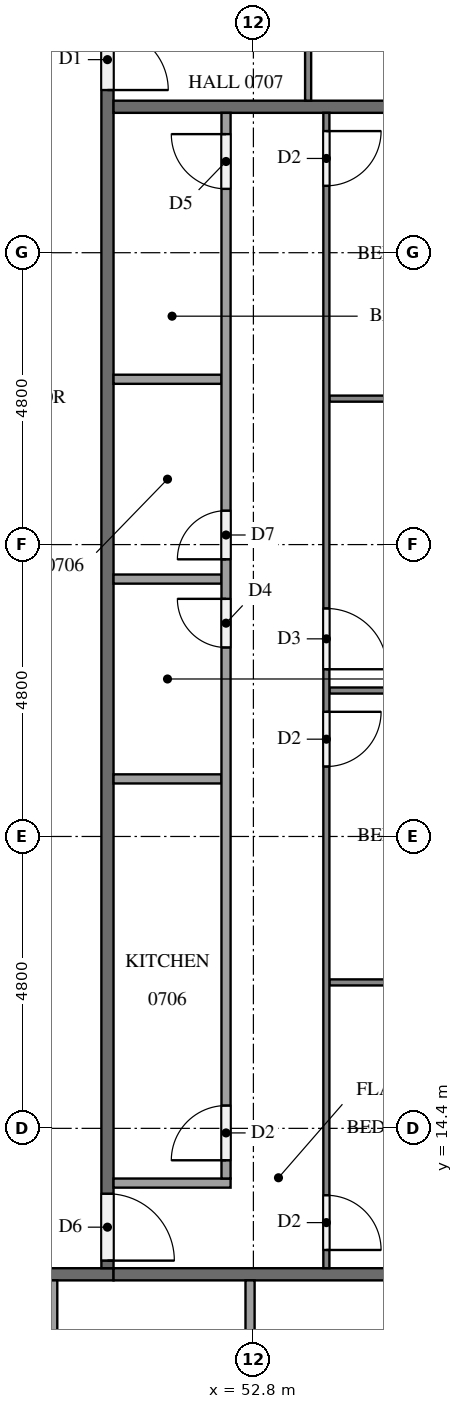
"""IFC4 building model, lengths in metres.
Left out: names, types, materials, properties, quantities, classifications, styles, units other than length and angle.
Written with IfcOpenShell. Run it as: python <this file> out.ifc"""

import sys

from ifc_helpers import new_model, si_unit, direction, frame, frame_2d, origin, place, context, subcontext, project, spatial, rectangle, extrude, element, fill, save


model = new_model("IFC4")
c1 = context("Model", 3, precision=1e-05, world=origin(), true_north=direction((0.0, 1.0)))
c2 = subcontext(c1, "Body", "Model", "MODEL_VIEW")
j1 = project(units=[si_unit("LENGTHUNIT", "METRE"), si_unit("PLANEANGLEUNIT", "RADIAN")], contexts=[c1])
p1 = place(None, origin())
s1 = spatial("IfcSite", under=j1, at=p1, CompositionType="ELEMENT")
p2 = place(p1, origin())
s2 = spatial("IfcBuilding", under=s1, at=p2, CompositionType="ELEMENT")
p3 = place(p2, frame((0.0, 0.0, 32.9)))
s3 = spatial("IfcBuildingStorey", under=s2, at=p3, CompositionType="ELEMENT", Elevation=32.9)
p4 = place(p3, frame((50.5, 12.0, 0.0), z_axis=(0.0, 0.0, 1.0), x_axis=(-1.0, 0.0, 0.0)))
e1 = element("IfcWall", 1, at=p4, inside=s3, PredefinedType="PARTITIONING", context=c2, shape_type="SweptSolid", body=[
    extrude(rectangle(XDim=38.6, YDim=0.2, at=frame_2d((19.3, 0.0))), origin(), (0.0, 0.0, 1.0), 3.2),
])
p5 = place(p4, frame((36.375, 0.0, 0.0)))
e2 = element("IfcOpeningElement", 2, at=p5, cuts=e1, PredefinedType="OPENING", context=c2, shape_type="SweptSolid", body=[
    extrude(rectangle(XDim=1.0, YDim=2.1, at=frame_2d((0.5, 1.05))), frame((0.0, 0.11, 0.0), z_axis=(0.0, -1.0, 0.0), x_axis=(1.0, 0.0, 0.0)), (0.0, 0.0, 1.0), 0.22),
])
p6 = place(p4, frame((34.825, 0.0, 0.0)))
e3 = element("IfcOpeningElement", 3, at=p6, cuts=e1, PredefinedType="OPENING", context=c2, shape_type="SweptSolid", body=[
    extrude(rectangle(XDim=1.0, YDim=2.1, at=frame_2d((0.5, 1.05))), frame((0.0, 0.11, 0.0), z_axis=(0.0, -1.0, 0.0), x_axis=(1.0, 0.0, 0.0)), (0.0, 0.0, 1.0), 0.22),
])
p7 = place(p4, frame((22.825, 0.0, 0.0)))
e4 = element("IfcOpeningElement", 4, at=p7, cuts=e1, PredefinedType="OPENING", context=c2, shape_type="SweptSolid", body=[
    extrude(rectangle(XDim=1.0, YDim=2.1, at=frame_2d((0.5, 1.05))), frame((0.0, 0.11, 0.0), z_axis=(0.0, -1.0, 0.0), x_axis=(1.0, 0.0, 0.0)), (0.0, 0.0, 1.0), 0.22),
])
p8 = place(p4, frame((8.425, 0.0, 0.0)))
e5 = element("IfcOpeningElement", 5, at=p8, cuts=e1, PredefinedType="OPENING", context=c2, shape_type="SweptSolid", body=[
    extrude(rectangle(XDim=1.0, YDim=2.1, at=frame_2d((0.5, 1.05))), frame((0.0, 0.11, 0.0), z_axis=(0.0, -1.0, 0.0), x_axis=(1.0, 0.0, 0.0)), (0.0, 0.0, 1.0), 0.22),
])
p9 = place(p4, frame((1.225, 0.0, 0.0)))
e6 = element("IfcOpeningElement", 6, at=p9, cuts=e1, PredefinedType="OPENING", context=c2, shape_type="SweptSolid", body=[
    extrude(rectangle(XDim=1.0, YDim=2.1, at=frame_2d((0.5, 1.05))), frame((0.0, 0.11, 0.0), z_axis=(0.0, -1.0, 0.0), x_axis=(1.0, 0.0, 0.0)), (0.0, 0.0, 1.0), 0.22),
])
p10 = place(p3, frame((50.4, 40.7, 0.0), z_axis=(0.0, 0.0, 1.0), x_axis=(0.0, -1.0, 0.0)))
e7 = element("IfcWall", 7, at=p10, inside=s3, PredefinedType="PARTITIONING", context=c2, shape_type="SweptSolid", body=[
    extrude(rectangle(XDim=28.6, YDim=0.2, at=frame_2d((14.3, 0.0))), origin(), (0.0, 0.0, 1.0), 3.2),
])
p11 = place(p10, frame((27.375, 0.0, 0.0)))
e8 = element("IfcOpeningElement", 8, at=p11, cuts=e7, PredefinedType="OPENING", context=c2, shape_type="SweptSolid", body=[
    extrude(rectangle(XDim=1.1, YDim=2.1, at=frame_2d((0.55, 1.05))), frame((0.0, 0.11, 0.0), z_axis=(0.0, -1.0, 0.0), x_axis=(1.0, 0.0, 0.0)), (0.0, 0.0, 1.0), 0.22),
])
p12 = place(p10, frame((8.225, 0.0, 0.0)))
e9 = element("IfcOpeningElement", 9, at=p12, cuts=e7, PredefinedType="OPENING", context=c2, shape_type="SweptSolid", body=[
    extrude(rectangle(XDim=1.0, YDim=2.1, at=frame_2d((0.5, 1.05))), frame((0.0, 0.11, 0.0), z_axis=(0.0, -1.0, 0.0), x_axis=(1.0, 0.0, 0.0)), (0.0, 0.0, 1.0), 0.22),
])
for number, where, z_axis, x_axis in (
    (10, (50.5, 12.0, 0.0), (0.0, 0.0, 1.0), (1.0, 0.0, 0.0)),
    (11, (50.5, 31.2, 0.0), (0.0, 0.0, 1.0), (1.0, 0.0, 0.0)),
):
    element("IfcWall", number, at=place(p3, frame(where, z_axis=z_axis, x_axis=x_axis)), inside=s3, PredefinedType="PARTITIONING", context=c2, shape_type="SweptSolid", body=[
        extrude(rectangle(XDim=7.0, YDim=0.2, at=frame_2d((3.5, 0.0))), origin(), (0.0, 0.0, 1.0), 3.2),
    ])
p13 = place(p3, frame((52.745, 11.9, 0.0), z_axis=(0.0, 0.0, 1.0), x_axis=(0.0, -1.0, 0.0)))
e12 = element("IfcWall", 12, at=p13, inside=s3, PredefinedType="PARTITIONING", context=c2, shape_type="SweptSolid", body=[
    extrude(rectangle(XDim=3.275, YDim=0.15, at=frame_2d((1.637, 0.0))), origin(), (0.0, 0.0, 1.0), 3.2),
])
p14 = place(p3, frame((49.5, 11.9, 0.0), z_axis=(0.0, 0.0, 1.0), x_axis=(0.0, -1.0, 0.0)))
e13 = element("IfcWall", 13, at=p14, inside=s3, PredefinedType="PARTITIONING", context=c2, shape_type="SweptSolid", body=[
    extrude(rectangle(XDim=3.425, YDim=0.15, at=frame_2d((1.712, 0.0))), origin(), (0.0, 0.0, 1.0), 3.2),
])
for number, where, z_axis, x_axis in (
    (14, (54.05, 16.8, 0.0), (0.0, 0.0, 1.0), (1.0, 0.0, 0.0)),
    (15, (54.05, 21.6, 0.0), (0.0, 0.0, 1.0), (1.0, 0.0, 0.0)),
    (16, (54.05, 26.4, 0.0), (0.0, 0.0, 1.0), (1.0, 0.0, 0.0)),
):
    element("IfcWall", number, at=place(p3, frame(where, z_axis=z_axis, x_axis=x_axis)), inside=s3, PredefinedType="PARTITIONING", context=c2, shape_type="SweptSolid", body=[
        extrude(rectangle(XDim=3.45, YDim=0.1, at=frame_2d((1.725, 0.0))), origin(), (0.0, 0.0, 1.0), 3.2),
    ])
p15 = place(p3, frame((54.0, 31.1, 0.0), z_axis=(0.0, 0.0, 1.0), x_axis=(0.0, -1.0, 0.0)))
e17 = element("IfcWall", 17, at=p15, inside=s3, PredefinedType="PARTITIONING", context=c2, shape_type="SweptSolid", body=[
    extrude(rectangle(XDim=19.0, YDim=0.1, at=frame_2d((9.5, 0.0))), origin(), (0.0, 0.0, 1.0), 3.2),
])
p16 = place(p15, frame((17.8, 0.0, 0.0)))
e18 = element("IfcOpeningElement", 18, at=p16, cuts=e17, PredefinedType="OPENING", context=c2, shape_type="SweptSolid", body=[
    extrude(rectangle(XDim=0.9, YDim=2.1, at=frame_2d((0.45, 1.05))), frame((0.0, 0.06, 0.0), z_axis=(0.0, -1.0, 0.0), x_axis=(1.0, 0.0, 0.0)), (0.0, 0.0, 1.0), 0.12),
])
p17 = place(p15, frame((9.85, 0.0, 0.0)))
e19 = element("IfcOpeningElement", 19, at=p17, cuts=e17, PredefinedType="OPENING", context=c2, shape_type="SweptSolid", body=[
    extrude(rectangle(XDim=0.9, YDim=2.1, at=frame_2d((0.45, 1.05))), frame((0.0, 0.06, 0.0), z_axis=(0.0, -1.0, 0.0), x_axis=(1.0, 0.0, 0.0)), (0.0, 0.0, 1.0), 0.12),
])
p18 = place(p15, frame((8.15, 0.0, 0.0)))
e20 = element("IfcOpeningElement", 20, at=p18, cuts=e17, PredefinedType="OPENING", context=c2, shape_type="SweptSolid", body=[
    extrude(rectangle(XDim=1.0, YDim=2.1, at=frame_2d((0.5, 1.05))), frame((0.0, 0.06, 0.0), z_axis=(0.0, -1.0, 0.0), x_axis=(1.0, 0.0, 0.0)), (0.0, 0.0, 1.0), 0.12),
])
p19 = place(p15, frame((0.3, 0.0, 0.0)))
e21 = element("IfcOpeningElement", 21, at=p19, cuts=e17, PredefinedType="OPENING", context=c2, shape_type="SweptSolid", body=[
    extrude(rectangle(XDim=0.9, YDim=2.1, at=frame_2d((0.45, 1.05))), frame((0.0, 0.06, 0.0), z_axis=(0.0, -1.0, 0.0), x_axis=(1.0, 0.0, 0.0)), (0.0, 0.0, 1.0), 0.12),
])
for number, where, z_axis, x_axis in (
    (22, (50.5, 20.147, 0.0), (0.0, 0.0, 1.0), (1.0, 0.0, 0.0)),
    (23, (50.5, 23.433, 0.0), (0.0, 0.0, 1.0), (1.0, 0.0, 0.0)),
    (24, (50.5, 26.719, 0.0), (0.0, 0.0, 1.0), (1.0, 0.0, 0.0)),
):
    element("IfcWall", number, at=place(p3, frame(where, z_axis=z_axis, x_axis=x_axis)), inside=s3, PredefinedType="PARTITIONING", context=c2, shape_type="SweptSolid", body=[
        extrude(rectangle(XDim=1.775, YDim=0.15, at=frame_2d((0.887, 0.0))), origin(), (0.0, 0.0, 1.0), 3.2),
    ])
p20 = place(p3, frame((50.5, 13.5, 0.0), z_axis=(0.0, 0.0, 1.0), x_axis=(1.0, 0.0, 0.0)))
e25 = element("IfcWall", 25, at=p20, inside=s3, PredefinedType="PARTITIONING", context=c2, shape_type="SweptSolid", body=[
    extrude(rectangle(XDim=1.925, YDim=0.15, at=frame_2d((0.962, 0.0))), origin(), (0.0, 0.0, 1.0), 3.2),
])
p21 = place(p3, frame((52.35, 13.575, 0.0), z_axis=(0.0, 0.0, 1.0), x_axis=(0.0, 1.0, 0.0)))
e26 = element("IfcWall", 26, at=p21, inside=s3, PredefinedType="PARTITIONING", context=c2, shape_type="SweptSolid", body=[
    extrude(rectangle(XDim=17.525, YDim=0.15, at=frame_2d((8.763, 0.0))), origin(), (0.0, 0.0, 1.0), 3.2),
])
p22 = place(p21, frame((0.3, 0.0, 0.0)))
e27 = element("IfcOpeningElement", 27, at=p22, cuts=e26, PredefinedType="OPENING", context=c2, shape_type="SweptSolid", body=[
    extrude(rectangle(XDim=0.9, YDim=2.1, at=frame_2d((0.45, 1.05))), frame((0.0, 0.085, 0.0), z_axis=(0.0, -1.0, 0.0), x_axis=(1.0, 0.0, 0.0)), (0.0, 0.0, 1.0), 0.17),
])
p23 = place(p21, frame((8.733, 0.0, 0.0)))
e28 = element("IfcOpeningElement", 28, at=p23, cuts=e26, PredefinedType="OPENING", context=c2, shape_type="SweptSolid", body=[
    extrude(rectangle(XDim=0.8, YDim=2.1, at=frame_2d((0.4, 1.05))), frame((0.0, 0.085, 0.0), z_axis=(0.0, -1.0, 0.0), x_axis=(1.0, 0.0, 0.0)), (0.0, 0.0, 1.0), 0.17),
])
p24 = place(p21, frame((10.183, 0.0, 0.0)))
e29 = element("IfcOpeningElement", 29, at=p24, cuts=e26, PredefinedType="OPENING", context=c2, shape_type="SweptSolid", body=[
    extrude(rectangle(XDim=0.8, YDim=2.1, at=frame_2d((0.4, 1.05))), frame((0.0, 0.085, 0.0), z_axis=(0.0, -1.0, 0.0), x_axis=(1.0, 0.0, 0.0)), (0.0, 0.0, 1.0), 0.17),
])
p25 = place(p21, frame((16.275, 0.0, 0.0)))
e30 = element("IfcOpeningElement", 30, at=p25, cuts=e26, PredefinedType="OPENING", context=c2, shape_type="SweptSolid", body=[
    extrude(rectangle(XDim=0.9, YDim=2.1, at=frame_2d((0.45, 1.05))), frame((0.0, 0.085, 0.0), z_axis=(0.0, -1.0, 0.0), x_axis=(1.0, 0.0, 0.0)), (0.0, 0.0, 1.0), 0.17),
])
p26 = place(p3, frame((53.7, 47.659, 0.0), z_axis=(0.0, 0.0, 1.0), x_axis=(0.0, -1.0, 0.0)))
e31 = element("IfcWall", 31, at=p26, inside=s3, PredefinedType="PARTITIONING", context=c2, shape_type="SweptSolid", body=[
    extrude(rectangle(XDim=16.359, YDim=0.1, at=frame_2d((8.179, 0.0))), origin(), (0.0, 0.0, 1.0), 3.2),
])
p27 = place(p26, frame((12.009, 0.0, 0.0)))
e32 = element("IfcOpeningElement", 32, at=p27, cuts=e31, PredefinedType="OPENING", context=c2, shape_type="SweptSolid", body=[
    extrude(rectangle(XDim=0.9, YDim=2.1, at=frame_2d((0.45, 1.05))), frame((0.0, 0.06, 0.0), z_axis=(0.0, -1.0, 0.0), x_axis=(1.0, 0.0, 0.0)), (0.0, 0.0, 1.0), 0.12),
])
p28 = place(p26, frame((10.309, 0.0, 0.0)))
e33 = element("IfcOpeningElement", 33, at=p28, cuts=e31, PredefinedType="OPENING", context=c2, shape_type="SweptSolid", body=[
    extrude(rectangle(XDim=1.0, YDim=2.1, at=frame_2d((0.5, 1.05))), frame((0.0, 0.06, 0.0), z_axis=(0.0, -1.0, 0.0), x_axis=(1.0, 0.0, 0.0)), (0.0, 0.0, 1.0), 0.12),
])
p29 = place(p26, frame((0.3, 0.0, 0.0)))
e34 = element("IfcOpeningElement", 34, at=p29, cuts=e31, PredefinedType="OPENING", context=c2, shape_type="SweptSolid", body=[
    extrude(rectangle(XDim=0.9, YDim=2.1, at=frame_2d((0.45, 1.05))), frame((0.0, 0.06, 0.0), z_axis=(0.0, -1.0, 0.0), x_axis=(1.0, 0.0, 0.0)), (0.0, 0.0, 1.0), 0.12),
])
p30 = place(p11, origin())
e35 = element("IfcDoor", 35, at=p30, inside=s3, OperationType="SINGLE_SWING_RIGHT", PredefinedType="DOOR", context=c2, shape_type="SweptSolid", body=[
    extrude(rectangle(XDim=1.1, YDim=2.1, at=frame_2d((0.55, 1.05))), frame((0.0, 0.025, 0.0), z_axis=(0.0, -1.0, 0.0), x_axis=(1.0, 0.0, 0.0)), (0.0, 0.0, 1.0), 0.05),
])
fill(e8, e35)
p31 = place(p12, origin())
e36 = element("IfcDoor", 36, at=p31, inside=s3, OperationType="SINGLE_SWING_RIGHT", PredefinedType="DOOR", context=c2, shape_type="SweptSolid", body=[
    extrude(rectangle(XDim=1.0, YDim=2.1, at=frame_2d((0.5, 1.05))), frame((0.0, 0.025, 0.0), z_axis=(0.0, -1.0, 0.0), x_axis=(1.0, 0.0, 0.0)), (0.0, 0.0, 1.0), 0.05),
])
fill(e9, e36)
p32 = place(p16, origin())
e37 = element("IfcDoor", 37, at=p32, inside=s3, OperationType="SINGLE_SWING_RIGHT", PredefinedType="DOOR", context=c2, shape_type="SweptSolid", body=[
    extrude(rectangle(XDim=0.9, YDim=2.1, at=frame_2d((0.45, 1.05))), frame((0.0, 0.025, 0.0), z_axis=(0.0, -1.0, 0.0), x_axis=(1.0, 0.0, 0.0)), (0.0, 0.0, 1.0), 0.05),
])
fill(e18, e37)
p33 = place(p17, origin())
e38 = element("IfcDoor", 38, at=p33, inside=s3, OperationType="SINGLE_SWING_LEFT", PredefinedType="DOOR", context=c2, shape_type="SweptSolid", body=[
    extrude(rectangle(XDim=0.9, YDim=2.1, at=frame_2d((0.45, 1.05))), frame((0.0, 0.025, 0.0), z_axis=(0.0, -1.0, 0.0), x_axis=(1.0, 0.0, 0.0)), (0.0, 0.0, 1.0), 0.05),
])
fill(e19, e38)
p34 = place(p18, origin())
e39 = element("IfcDoor", 39, at=p34, inside=s3, OperationType="SINGLE_SWING_RIGHT", PredefinedType="DOOR", context=c2, shape_type="SweptSolid", body=[
    extrude(rectangle(XDim=1.0, YDim=2.1, at=frame_2d((0.5, 1.05))), frame((0.0, 0.025, 0.0), z_axis=(0.0, -1.0, 0.0), x_axis=(1.0, 0.0, 0.0)), (0.0, 0.0, 1.0), 0.05),
])
fill(e20, e39)
p35 = place(p19, origin())
e40 = element("IfcDoor", 40, at=p35, inside=s3, OperationType="SINGLE_SWING_LEFT", PredefinedType="DOOR", context=c2, shape_type="SweptSolid", body=[
    extrude(rectangle(XDim=0.9, YDim=2.1, at=frame_2d((0.45, 1.05))), frame((0.0, 0.025, 0.0), z_axis=(0.0, -1.0, 0.0), x_axis=(1.0, 0.0, 0.0)), (0.0, 0.0, 1.0), 0.05),
])
fill(e21, e40)
p36 = place(p22, origin())
e41 = element("IfcDoor", 41, at=p36, inside=s3, OperationType="SINGLE_SWING_LEFT", PredefinedType="DOOR", context=c2, shape_type="SweptSolid", body=[
    extrude(rectangle(XDim=0.9, YDim=2.1, at=frame_2d((0.45, 1.05))), frame((0.0, 0.025, 0.0), z_axis=(0.0, -1.0, 0.0), x_axis=(1.0, 0.0, 0.0)), (0.0, 0.0, 1.0), 0.05),
])
fill(e27, e41)
p37 = place(p23, origin())
e42 = element("IfcDoor", 42, at=p37, inside=s3, OperationType="SINGLE_SWING_RIGHT", PredefinedType="DOOR", context=c2, shape_type="SweptSolid", body=[
    extrude(rectangle(XDim=0.8, YDim=2.1, at=frame_2d((0.4, 1.05))), frame((0.0, 0.025, 0.0), z_axis=(0.0, -1.0, 0.0), x_axis=(1.0, 0.0, 0.0)), (0.0, 0.0, 1.0), 0.05),
])
fill(e28, e42)
p38 = place(p24, origin())
e43 = element("IfcDoor", 43, at=p38, inside=s3, OperationType="SINGLE_SWING_LEFT", PredefinedType="DOOR", context=c2, shape_type="SweptSolid", body=[
    extrude(rectangle(XDim=0.8, YDim=2.1, at=frame_2d((0.4, 1.05))), frame((0.0, 0.025, 0.0), z_axis=(0.0, -1.0, 0.0), x_axis=(1.0, 0.0, 0.0)), (0.0, 0.0, 1.0), 0.05),
])
fill(e29, e43)
p39 = place(p25, origin())
e44 = element("IfcDoor", 44, at=p39, inside=s3, OperationType="SINGLE_SWING_RIGHT", PredefinedType="DOOR", context=c2, shape_type="SweptSolid", body=[
    extrude(rectangle(XDim=0.9, YDim=2.1, at=frame_2d((0.45, 1.05))), frame((0.0, 0.025, 0.0), z_axis=(0.0, -1.0, 0.0), x_axis=(1.0, 0.0, 0.0)), (0.0, 0.0, 1.0), 0.05),
])
fill(e30, e44)
save(model, sys.argv[1])
